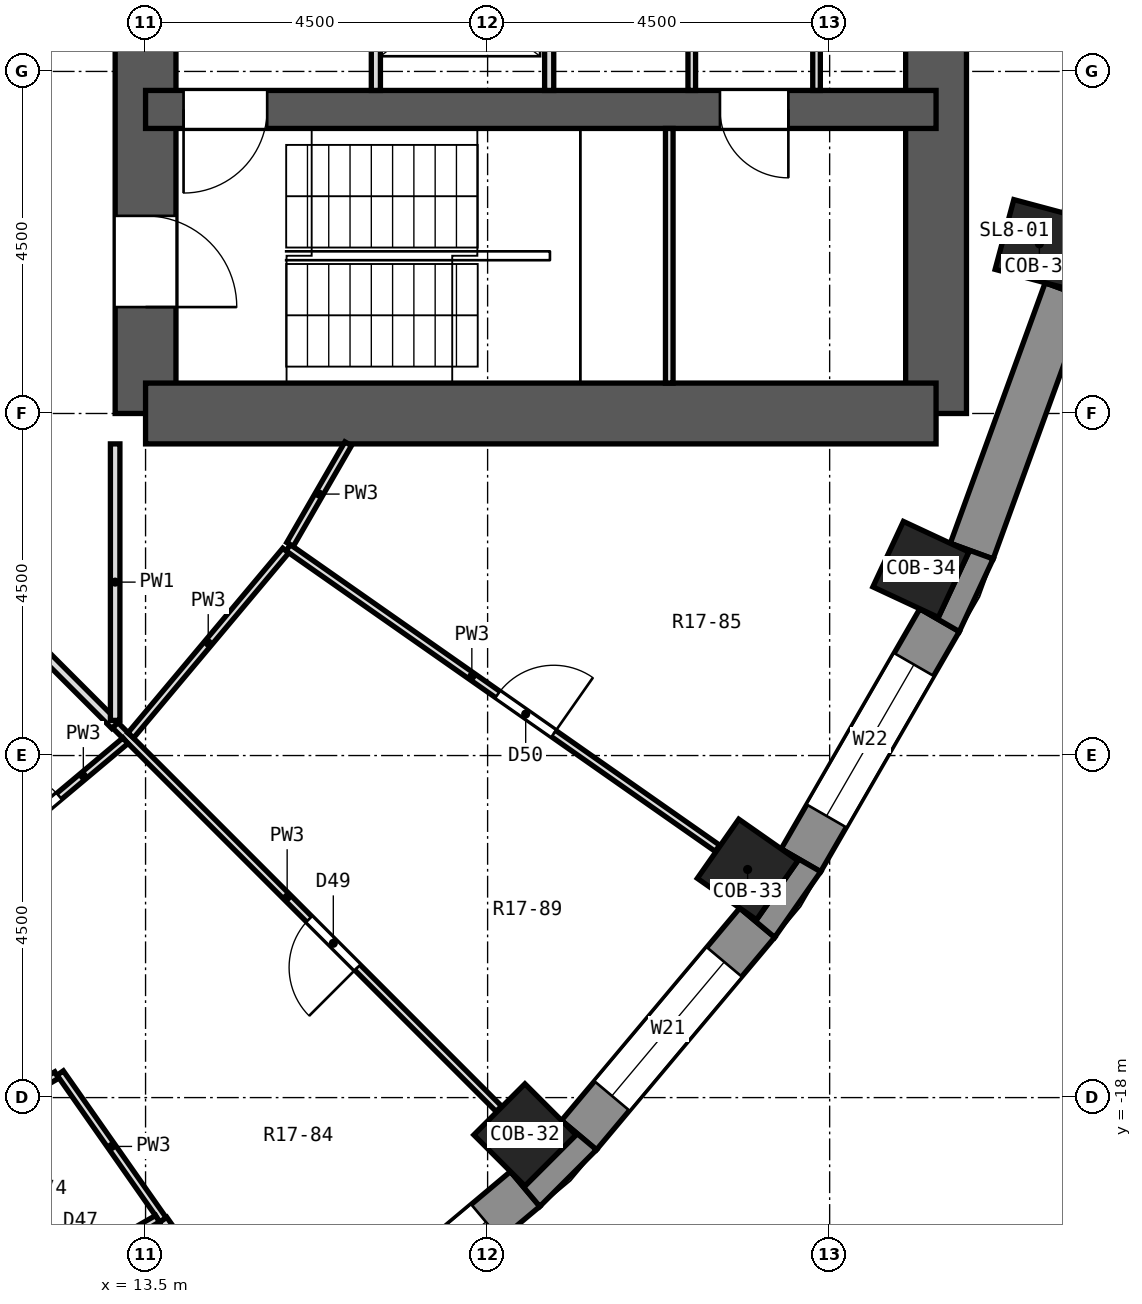
"""IFC4 building model, lengths in metres.
Left out: names, types, materials, properties, quantities, classifications, styles, units other than length and angle.
Written with IfcOpenShell. Run it as: python <this file> out.ifc"""

import sys

from ifc_helpers import new_model, si_unit, direction, frame, frame_2d, origin, origin_2d, place, context, subcontext, project, spatial, polyline, rectangle, outline, extrude, element, fill, save


model = new_model("IFC4")
c1 = context("Model", 3, precision=1e-05, world=origin(), true_north=direction((0.0, 1.0)))
c2 = subcontext(c1, "Body", "Model", "MODEL_VIEW")
j1 = project(units=[si_unit("LENGTHUNIT", "METRE"), si_unit("PLANEANGLEUNIT", "RADIAN")], contexts=[c1])
p1 = place(None, origin())
s1 = spatial("IfcSite", under=j1, at=p1, CompositionType="ELEMENT")
p2 = place(p1, origin())
s2 = spatial("IfcBuilding", under=s1, at=p2, CompositionType="ELEMENT")
p3 = place(p2, frame((0.0, 0.0, 91.9)))
s3 = spatial("IfcBuildingStorey", under=s2, at=p3, CompositionType="ELEMENT", Elevation=91.9)
for number, where, z_axis, x_axis in (
    (1, (18.491, -18.491, 0.0), (0.0, 0.0, 1.0), (0.707, -0.707, 0.0)),
    (2, (21.421, -14.999, 0.0), (0.0, 0.0, 1.0), (0.819, -0.574, 0.0)),
    (3, (23.7, -11.052, 0.0), (0.0, 0.0, 1.0), (0.906, -0.423, 0.0)),
    (4, (25.259, -6.768, 0.0), (0.0, 0.0, 1.0), (0.966, -0.259, 0.0)),
):
    element("IfcColumn", number, at=place(p3, frame(where, z_axis=z_axis, x_axis=x_axis)), inside=s3, PredefinedType="COLUMN", context=c2, shape_type="SweptSolid", body=[
        extrude(rectangle(XDim=0.95, YDim=0.95, at=origin_2d()), origin(), (0.0, 0.0, 1.0), 3.3),
    ])
p4 = place(p3, frame((13.5, -9.0, 0.0), z_axis=(0.0, 0.0, 1.0), x_axis=(0.0, 1.0, 0.0)))
e5 = element("IfcWall", 5, at=p4, inside=s3, PredefinedType="SHEAR", context=c2, shape_type="SweptSolid", body=[
    extrude(rectangle(XDim=18.0, YDim=0.8, at=frame_2d((9.0, 0.0))), origin(), (0.0, 0.0, 1.0), 3.3),
])
p5 = place(p4, frame((15.4, 0.0, 0.0)))
e6 = element("IfcOpeningElement", 6, at=p5, cuts=e5, PredefinedType="OPENING", context=c2, shape_type="SweptSolid", body=[
    extrude(rectangle(XDim=1.2, YDim=2.1, at=frame_2d((0.6, 1.05))), frame((0.0, 0.412, 0.0), z_axis=(0.0, -1.0, 0.0), x_axis=(1.0, 0.0, 0.0)), (0.0, 0.0, 1.0), 0.824),
])
p6 = place(p4, frame((1.4, 0.0, 0.0)))
e7 = element("IfcOpeningElement", 7, at=p6, cuts=e5, PredefinedType="OPENING", context=c2, shape_type="SweptSolid", body=[
    extrude(rectangle(XDim=1.2, YDim=2.1, at=frame_2d((0.6, 1.05))), frame((0.0, 0.412, 0.0), z_axis=(0.0, -1.0, 0.0), x_axis=(1.0, 0.0, 0.0)), (0.0, 0.0, 1.0), 0.824),
])
p7 = place(p4, frame((7.5, 0.0, 0.0)))
e8 = element("IfcOpeningElement", 8, at=p7, cuts=e5, PredefinedType="OPENING", context=c2, shape_type="SweptSolid", body=[
    extrude(rectangle(XDim=3.0, YDim=2.4, at=frame_2d((1.5, 1.2))), frame((0.0, 0.412, 0.0), z_axis=(0.0, -1.0, 0.0), x_axis=(1.0, 0.0, 0.0)), (0.0, 0.0, 1.0), 0.824),
])
p8 = place(p3, frame((23.9, -9.0, 0.0), z_axis=(0.0, 0.0, 1.0), x_axis=(0.0, 1.0, 0.0)))
e9 = element("IfcWall", 9, at=p8, inside=s3, PredefinedType="SHEAR", context=c2, shape_type="SweptSolid", body=[
    extrude(rectangle(XDim=18.0, YDim=0.8, at=frame_2d((9.0, 0.0))), origin(), (0.0, 0.0, 1.0), 3.3),
])
p9 = place(p3, frame((13.5, -9.0, 0.0), z_axis=(0.0, 0.0, 1.0), x_axis=(1.0, 0.0, 0.0)))
e10 = element("IfcWall", 10, at=p9, inside=s3, PredefinedType="SHEAR", context=c2, shape_type="SweptSolid", body=[
    extrude(rectangle(XDim=10.4, YDim=0.8, at=frame_2d((5.2, 0.0))), origin(), (0.0, 0.0, 1.0), 3.3),
])
p10 = place(p3, frame((13.5, -5.0, 0.0), z_axis=(0.0, 0.0, 1.0), x_axis=(1.0, 0.0, 0.0)))
e11 = element("IfcWall", 11, at=p10, inside=s3, PredefinedType="SHEAR", context=c2, shape_type="SweptSolid", body=[
    extrude(rectangle(XDim=10.4, YDim=0.5, at=frame_2d((5.2, 0.0))), origin(), (0.0, 0.0, 1.0), 3.3),
])
p11 = place(p10, frame((7.557, 0.0, 0.0)))
e12 = element("IfcOpeningElement", 12, at=p11, cuts=e11, PredefinedType="OPENING", context=c2, shape_type="SweptSolid", body=[
    extrude(rectangle(XDim=0.9, YDim=2.1, at=frame_2d((0.45, 1.05))), frame((0.0, 0.262, 0.0), z_axis=(0.0, -1.0, 0.0), x_axis=(1.0, 0.0, 0.0)), (0.0, 0.0, 1.0), 0.524),
])
p12 = place(p10, frame((0.5, 0.0, 0.0)))
e13 = element("IfcOpeningElement", 13, at=p12, cuts=e11, PredefinedType="OPENING", context=c2, shape_type="SweptSolid", body=[
    extrude(rectangle(XDim=1.1, YDim=2.1, at=frame_2d((0.55, 1.05))), frame((0.0, 0.262, 0.0), z_axis=(0.0, -1.0, 0.0), x_axis=(1.0, 0.0, 0.0)), (0.0, 0.0, 1.0), 0.524),
])
p13 = place(p3, frame((15.699, -21.547, 0.0), z_axis=(0.0, 0.0, 1.0), x_axis=(0.766055462616, 0.642774476932, 0.0)))
e14 = element("IfcWall", 14, at=p13, inside=s3, PredefinedType="SOLIDWALL", context=c2, shape_type="SweptSolid", body=[
    extrude(rectangle(XDim=3.648, YDim=0.6, at=frame_2d((1.824, 0.0))), origin(), (0.0, 0.0, 1.0), 2.8),
])
p14 = place(p13, frame((0.674, 0.0, 0.9)))
e15 = element("IfcOpeningElement", 15, at=p14, cuts=e14, PredefinedType="OPENING", context=c2, shape_type="SweptSolid", body=[
    extrude(rectangle(XDim=2.3, YDim=1.8, at=frame_2d((1.15, 0.9))), frame((0.0, 0.312, 0.0), z_axis=(0.0, -1.0, 0.0), x_axis=(1.0, 0.0, 0.0)), (0.0, 0.0, 1.0), 0.624),
])
p15 = place(p3, frame((19.202, -18.494, 0.0), z_axis=(0.0, 0.0, 1.0), x_axis=(0.642774476932, 0.766055462616, 0.0)))
e16 = element("IfcWall", 16, at=p15, inside=s3, PredefinedType="SOLIDWALL", context=c2, shape_type="SweptSolid", body=[
    extrude(rectangle(XDim=3.648, YDim=0.6, at=frame_2d((1.824, 0.0))), origin(), (0.0, 0.0, 1.0), 2.8),
])
p16 = place(p15, frame((0.674, 0.0, 0.9)))
e17 = element("IfcOpeningElement", 17, at=p16, cuts=e16, PredefinedType="OPENING", context=c2, shape_type="SweptSolid", body=[
    extrude(rectangle(XDim=2.3, YDim=1.8, at=frame_2d((1.15, 0.9))), frame((0.0, 0.312, 0.0), z_axis=(0.0, -1.0, 0.0), x_axis=(1.0, 0.0, 0.0)), (0.0, 0.0, 1.0), 0.624),
])
p17 = place(p3, frame((22.122, -14.878, 0.0), z_axis=(0.0, 0.0, 1.0), x_axis=(0.499954196102, 0.866051847062, 0.0)))
e18 = element("IfcWall", 18, at=p17, inside=s3, PredefinedType="SOLIDWALL", context=c2, shape_type="SweptSolid", body=[
    extrude(rectangle(XDim=3.648, YDim=0.6, at=frame_2d((1.824, 0.0))), origin(), (0.0, 0.0, 1.0), 2.8),
])
p18 = place(p17, frame((0.674, 0.0, 0.9)))
e19 = element("IfcOpeningElement", 19, at=p18, cuts=e18, PredefinedType="OPENING", context=c2, shape_type="SweptSolid", body=[
    extrude(rectangle(XDim=2.3, YDim=1.8, at=frame_2d((1.15, 0.9))), frame((0.0, 0.312, 0.0), z_axis=(0.0, -1.0, 0.0), x_axis=(1.0, 0.0, 0.0)), (0.0, 0.0, 1.0), 0.624),
])
p19 = place(p3, frame((24.369, -10.811, 0.0), z_axis=(0.0, 0.0, 1.0), x_axis=(0.341990236633, 0.939703505393, 0.0)))
e20 = element("IfcWall", 20, at=p19, inside=s3, PredefinedType="SOLIDWALL", context=c2, shape_type="SweptSolid", body=[
    extrude(rectangle(XDim=3.648, YDim=0.6, at=frame_2d((1.824, 0.0))), origin(), (0.0, 0.0, 1.0), 2.8),
])
p20 = place(p3, origin())
e21 = element("IfcWall", 21, at=p20, inside=s3, PredefinedType="SOLIDWALL", context=c2, shape_type="SweptSolid", body=[
    extrude(outline(polyline([(18.686, -19.432), (19.432, -18.686), (18.972, -18.301), (19.163, -18.491), (18.491, -19.163), (18.301, -18.972), (18.686, -19.432)])), origin(), (0.0, 0.0, 1.0), 2.8),
])
p21 = place(p3, origin())
e22 = element("IfcWall", 22, at=p21, inside=s3, PredefinedType="SOLIDWALL", context=c2, shape_type="SweptSolid", body=[
    extrude(outline(polyline([(22.382, -15.028), (21.862, -14.728), (22.083, -14.882), (21.538, -15.661), (21.317, -15.506), (21.777, -15.892), (22.382, -15.028)])), origin(), (0.0, 0.0, 1.0), 2.8),
])
p22 = place(p3, origin())
e23 = element("IfcWall", 23, at=p22, inside=s3, PredefinedType="SOLIDWALL", context=c2, shape_type="SweptSolid", body=[
    extrude(outline(polyline([(24.651, -10.913), (24.087, -10.708), (24.331, -10.822), (23.93, -11.683), (23.686, -11.569), (24.206, -11.869), (24.651, -10.913)])), origin(), (0.0, 0.0, 1.0), 2.8),
])
p23 = place(p3, origin())
e24 = element("IfcWall", 24, at=p23, inside=s3, PredefinedType="SOLIDWALL", context=c2, shape_type="SweptSolid", body=[
    extrude(outline(polyline([(25.899, -7.486), (26.172, -6.467), (25.581, -6.363), (25.841, -6.432), (25.595, -7.35), (25.335, -7.28), (25.899, -7.486)])), origin(), (0.0, 0.0, 1.0), 2.8),
])
p24 = place(p3, frame((12.377, -17.677, 0.0), z_axis=(0.0, 0.0, 1.0), x_axis=(0.573802663203, -0.818993591978, 0.0)))
e25 = element("IfcWall", 25, at=p24, inside=s3, PredefinedType="PARTITIONING", context=c2, shape_type="SweptSolid", body=[
    extrude(rectangle(XDim=2.359, YDim=0.1, at=frame_2d((1.179, 0.0))), origin(), (0.0, 0.0, 1.0), 2.8),
])
p25 = place(p3, frame((13.729, -19.61, 0.0), z_axis=(0.0, 0.0, 1.0), x_axis=(0.5734149023, -0.819265127917, 0.0)))
e26 = element("IfcWall", 26, at=p25, inside=s3, PredefinedType="PARTITIONING", context=c2, shape_type="SweptSolid", body=[
    extrude(rectangle(XDim=1.727, YDim=0.125, at=frame_2d((0.863, 0.0))), origin(), (0.0, 0.0, 1.0), 2.8),
])
p26 = place(p3, frame((13.1, -13.1, 0.0), z_axis=(0.0, 0.0, 1.0), x_axis=(0.707106781187, -0.707106781187, 0.0)))
e27 = element("IfcWall", 27, at=p26, inside=s3, PredefinedType="PARTITIONING", context=c2, shape_type="SweptSolid", body=[
    extrude(rectangle(XDim=7.139, YDim=0.1, at=frame_2d((3.569, 0.0))), origin(), (0.0, 0.0, 1.0), 2.8),
])
p27 = place(p26, frame((3.609, 0.0, 0.0)))
e28 = element("IfcOpeningElement", 28, at=p27, cuts=e27, PredefinedType="OPENING", context=c2, shape_type="SweptSolid", body=[
    extrude(rectangle(XDim=0.9, YDim=2.1, at=frame_2d((0.45, 1.05))), frame((0.0, 0.062, 0.0), z_axis=(0.0, -1.0, 0.0), x_axis=(1.0, 0.0, 0.0)), (0.0, 0.0, 1.0), 0.124),
])
p28 = place(p3, frame((7.808, -7.808, 0.0), z_axis=(0.0, 0.0, 1.0), x_axis=(0.707106781187, -0.707106781187, 0.0)))
e29 = element("IfcWall", 29, at=p28, inside=s3, PredefinedType="PARTITIONING", context=c2, shape_type="SweptSolid", body=[
    extrude(rectangle(XDim=7.484, YDim=0.125, at=frame_2d((3.742, 0.0))), origin(), (0.0, 0.0, 1.0), 2.8),
])
p29 = place(p3, frame((15.376, -10.766, 0.0), z_axis=(0.0, 0.0, 1.0), x_axis=(0.819178682921, -0.573538390562, 0.0)))
e30 = element("IfcWall", 30, at=p29, inside=s3, PredefinedType="PARTITIONING", context=c2, shape_type="SweptSolid", body=[
    extrude(rectangle(XDim=6.895, YDim=0.1, at=frame_2d((3.447, 0.0))), origin(), (0.0, 0.0, 1.0), 2.8),
])
p30 = place(p29, frame((3.365, 0.0, 0.0)))
e31 = element("IfcOpeningElement", 31, at=p30, cuts=e30, PredefinedType="OPENING", context=c2, shape_type="SweptSolid", body=[
    extrude(rectangle(XDim=0.9, YDim=2.1, at=frame_2d((0.45, 1.05))), frame((0.0, 0.062, 0.0), z_axis=(0.0, -1.0, 0.0), x_axis=(1.0, 0.0, 0.0)), (0.0, 0.0, 1.0), 0.124),
])
p31 = place(p3, frame((11.631, -20.763, 0.0), z_axis=(0.0, 0.0, 1.0), x_axis=(0.866102146699, 0.499867053809, 0.0)))
e32 = element("IfcWall", 32, at=p31, inside=s3, PredefinedType="PARTITIONING", context=c2, shape_type="SweptSolid", body=[
    extrude(rectangle(XDim=2.339, YDim=0.1, at=frame_2d((1.169, 0.0))), origin(), (0.0, 0.0, 1.0), 2.8),
])
p32 = place(p31, frame((0.771, 0.0, 0.0)))
e33 = element("IfcOpeningElement", 33, at=p32, cuts=e32, PredefinedType="OPENING", context=c2, shape_type="SweptSolid", body=[
    extrude(rectangle(XDim=0.8, YDim=2.1, at=frame_2d((0.4, 1.05))), frame((0.0, 0.062, 0.0), z_axis=(0.0, -1.0, 0.0), x_axis=(1.0, 0.0, 0.0)), (0.0, 0.0, 1.0), 0.124),
])
p33 = place(p3, frame((10.511, -18.754, 0.0), z_axis=(0.0, 0.0, 1.0), x_axis=(0.866117845619, 0.499839851853, 0.0)))
e34 = element("IfcWall", 34, at=p33, inside=s3, PredefinedType="PARTITIONING", context=c2, shape_type="SweptSolid", body=[
    extrude(rectangle(XDim=2.1, YDim=0.1, at=frame_2d((1.05, 0.0))), origin(), (0.0, 0.0, 1.0), 2.8),
])
p34 = place(p3, frame((10.804, -15.344, 0.0), z_axis=(0.0, 0.0, 1.0), x_axis=(0.766167094934, 0.642641410618, 0.0)))
e35 = element("IfcWall", 35, at=p34, inside=s3, PredefinedType="PARTITIONING", context=c2, shape_type="SweptSolid", body=[
    extrude(rectangle(XDim=3.172, YDim=0.1, at=frame_2d((1.586, 0.0))), origin(), (0.0, 0.0, 1.0), 2.8),
])
p35 = place(p34, frame((1.136, 0.0, 0.0)))
e36 = element("IfcOpeningElement", 36, at=p35, cuts=e35, PredefinedType="OPENING", context=c2, shape_type="SweptSolid", body=[
    extrude(rectangle(XDim=0.9, YDim=2.1, at=frame_2d((0.45, 1.05))), frame((0.0, 0.062, 0.0), z_axis=(0.0, -1.0, 0.0), x_axis=(1.0, 0.0, 0.0)), (0.0, 0.0, 1.0), 0.124),
])
p36 = place(p3, frame((13.305, -13.235, 0.0), z_axis=(0.0, 0.0, 1.0), x_axis=(0.642641410618, 0.766167094934, 0.0)))
e37 = element("IfcWall", 37, at=p36, inside=s3, PredefinedType="PARTITIONING", context=c2, shape_type="SweptSolid", body=[
    extrude(rectangle(XDim=3.172, YDim=0.1, at=frame_2d((1.586, 0.0))), origin(), (0.0, 0.0, 1.0), 2.8),
])
p37 = place(p3, frame((15.401, -10.723, 0.0), z_axis=(0.0, 0.0, 1.0), x_axis=(0.500035603698, 0.866004847004, 0.0)))
e38 = element("IfcWall", 38, at=p37, inside=s3, PredefinedType="PARTITIONING", context=c2, shape_type="SweptSolid", body=[
    extrude(rectangle(XDim=1.53, YDim=0.1, at=frame_2d((0.765, 0.0))), origin(), (0.0, 0.0, 1.0), 2.8),
])
p38 = place(p3, frame((13.1, -13.038, 0.0), z_axis=(0.0, 0.0, 1.0), x_axis=(0.0, 1.0, 0.0)))
e39 = element("IfcWall", 39, at=p38, inside=s3, PredefinedType="PARTITIONING", context=c2, shape_type="SweptSolid", body=[
    extrude(rectangle(XDim=3.638, YDim=0.125, at=frame_2d((1.819, 0.0))), origin(), (0.0, 0.0, 1.0), 2.8),
])
p39 = place(p3, frame((16.53, -4.75, 0.0), z_axis=(0.0, 0.0, 1.0), x_axis=(0.0, 1.0, 0.0)))
e40 = element("IfcWall", 40, at=p39, inside=s3, PredefinedType="PARTITIONING", context=c2, shape_type="SweptSolid", body=[
    extrude(rectangle(XDim=2.5, YDim=0.12, at=frame_2d((1.25, 0.0))), origin(), (0.0, 0.0, 1.0), 2.8),
])
p40 = place(p39, frame((0.7, 0.0, 0.0)))
e41 = element("IfcOpeningElement", 41, at=p40, cuts=e40, PredefinedType="OPENING", context=c2, shape_type="SweptSolid", body=[
    extrude(rectangle(XDim=1.1, YDim=2.1, at=frame_2d((0.55, 1.05))), frame((0.0, 0.072, 0.0), z_axis=(0.0, -1.0, 0.0), x_axis=(1.0, 0.0, 0.0)), (0.0, 0.0, 1.0), 0.144),
])
p41 = place(p3, frame((18.81, -4.75, 0.0), z_axis=(0.0, 0.0, 1.0), x_axis=(0.0, 1.0, 0.0)))
e42 = element("IfcWall", 42, at=p41, inside=s3, PredefinedType="PARTITIONING", context=c2, shape_type="SweptSolid", body=[
    extrude(rectangle(XDim=2.5, YDim=0.12, at=frame_2d((1.25, 0.0))), origin(), (0.0, 0.0, 1.0), 2.8),
])
for number, where, z_axis, x_axis in (
    (43, (20.686, -4.75, 0.0), (0.0, 0.0, 1.0), (0.0, 1.0, 0.0)),
    (44, (22.327, -4.75, 0.0), (0.0, 0.0, 1.0), (0.0, 1.0, 0.0)),
):
    element("IfcWall", number, at=place(p3, frame(where, z_axis=z_axis, x_axis=x_axis)), inside=s3, PredefinedType="PARTITIONING", context=c2, shape_type="SweptSolid", body=[
        extrude(rectangle(XDim=2.5, YDim=0.1, at=frame_2d((1.25, 0.0))), origin(), (0.0, 0.0, 1.0), 2.8),
    ])
p42 = place(p3, frame((20.39, -8.6, 0.0), z_axis=(0.0, 0.0, 1.0), x_axis=(0.0, 1.0, 0.0)))
e45 = element("IfcWall", 45, at=p42, inside=s3, PredefinedType="PARTITIONING", context=c2, shape_type="SweptSolid", body=[
    extrude(rectangle(XDim=3.35, YDim=0.1, at=frame_2d((1.675, 0.0))), origin(), (0.0, 0.0, 1.0), 2.8),
])
p43 = place(p14, origin())
e46 = element("IfcWindow", 46, at=p43, inside=s3, PartitioningType="SINGLE_PANEL", PredefinedType="WINDOW", context=c2, shape_type="SweptSolid", body=[
    extrude(rectangle(XDim=2.3, YDim=1.8, at=frame_2d((1.15, 0.9))), frame((0.0, 0.18, 0.0), z_axis=(0.0, -1.0, 0.0), x_axis=(1.0, 0.0, 0.0)), (0.0, 0.0, 1.0), 0.06),
])
fill(e15, e46)
p44 = place(p16, origin())
e47 = element("IfcWindow", 47, at=p44, inside=s3, PartitioningType="SINGLE_PANEL", PredefinedType="WINDOW", context=c2, shape_type="SweptSolid", body=[
    extrude(rectangle(XDim=2.3, YDim=1.8, at=frame_2d((1.15, 0.9))), frame((0.0, 0.18, 0.0), z_axis=(0.0, -1.0, 0.0), x_axis=(1.0, 0.0, 0.0)), (0.0, 0.0, 1.0), 0.06),
])
fill(e17, e47)
p45 = place(p18, origin())
e48 = element("IfcWindow", 48, at=p45, inside=s3, PartitioningType="SINGLE_PANEL", PredefinedType="WINDOW", context=c2, shape_type="SweptSolid", body=[
    extrude(rectangle(XDim=2.3, YDim=1.8, at=frame_2d((1.15, 0.9))), frame((0.0, 0.18, 0.0), z_axis=(0.0, -1.0, 0.0), x_axis=(1.0, 0.0, 0.0)), (0.0, 0.0, 1.0), 0.06),
])
fill(e19, e48)
p46 = place(p35, origin())
e49 = element("IfcDoor", 49, at=p46, inside=s3, OperationType="SINGLE_SWING_LEFT", PredefinedType="DOOR", context=c2, shape_type="SweptSolid", body=[
    extrude(rectangle(XDim=0.9, YDim=2.1, at=frame_2d((0.45, 1.05))), frame((0.0, 0.025, 0.0), z_axis=(0.0, -1.0, 0.0), x_axis=(1.0, 0.0, 0.0)), (0.0, 0.0, 1.0), 0.05),
])
fill(e36, e49)
p47 = place(p27, frame((0.9, 0.0, 0.0), z_axis=(0.0, 0.0, 1.0), x_axis=(-1.0, 0.0, 0.0)))
e50 = element("IfcDoor", 50, at=p47, inside=s3, OperationType="SINGLE_SWING_LEFT", PredefinedType="DOOR", context=c2, shape_type="SweptSolid", body=[
    extrude(rectangle(XDim=0.9, YDim=2.1, at=frame_2d((0.45, 1.05))), frame((0.0, 0.025, 0.0), z_axis=(0.0, -1.0, 0.0), x_axis=(1.0, 0.0, 0.0)), (0.0, 0.0, 1.0), 0.05),
])
fill(e28, e50)
p48 = place(p30, origin())
e51 = element("IfcDoor", 51, at=p48, inside=s3, OperationType="SINGLE_SWING_RIGHT", PredefinedType="DOOR", context=c2, shape_type="SweptSolid", body=[
    extrude(rectangle(XDim=0.9, YDim=2.1, at=frame_2d((0.45, 1.05))), frame((0.0, 0.025, 0.0), z_axis=(0.0, -1.0, 0.0), x_axis=(1.0, 0.0, 0.0)), (0.0, 0.0, 1.0), 0.05),
])
fill(e31, e51)
p49 = place(p11, frame((0.9, 0.0, 0.0), z_axis=(0.0, 0.0, 1.0), x_axis=(-1.0, 0.0, 0.0)))
e52 = element("IfcDoor", 52, at=p49, inside=s3, OperationType="SINGLE_SWING_LEFT", PredefinedType="DOOR", context=c2, shape_type="SweptSolid", body=[
    extrude(rectangle(XDim=0.9, YDim=2.1, at=frame_2d((0.45, 1.05))), frame((0.0, 0.025, 0.0), z_axis=(0.0, -1.0, 0.0), x_axis=(1.0, 0.0, 0.0)), (0.0, 0.0, 1.0), 0.05),
])
fill(e12, e52)
p50 = place(p12, frame((1.1, 0.0, 0.0), z_axis=(0.0, 0.0, 1.0), x_axis=(-1.0, 0.0, 0.0)))
e53 = element("IfcDoor", 53, at=p50, inside=s3, OperationType="SINGLE_SWING_RIGHT", PredefinedType="DOOR", context=c2, shape_type="SweptSolid", body=[
    extrude(rectangle(XDim=1.1, YDim=2.1, at=frame_2d((0.55, 1.05))), frame((0.0, 0.025, 0.0), z_axis=(0.0, -1.0, 0.0), x_axis=(1.0, 0.0, 0.0)), (0.0, 0.0, 1.0), 0.05),
])
fill(e13, e53)
p51 = place(p6, frame((1.2, 0.0, 0.0), z_axis=(0.0, 0.0, 1.0), x_axis=(-1.0, 0.0, 0.0)))
e54 = element("IfcDoor", 54, at=p51, inside=s3, OperationType="SINGLE_SWING_RIGHT", PredefinedType="DOOR", context=c2, shape_type="SweptSolid", body=[
    extrude(rectangle(XDim=1.2, YDim=2.1, at=frame_2d((0.6, 1.05))), frame((0.0, 0.025, 0.0), z_axis=(0.0, -1.0, 0.0), x_axis=(1.0, 0.0, 0.0)), (0.0, 0.0, 1.0), 0.05),
])
fill(e7, e54)
save(model, sys.argv[1])
